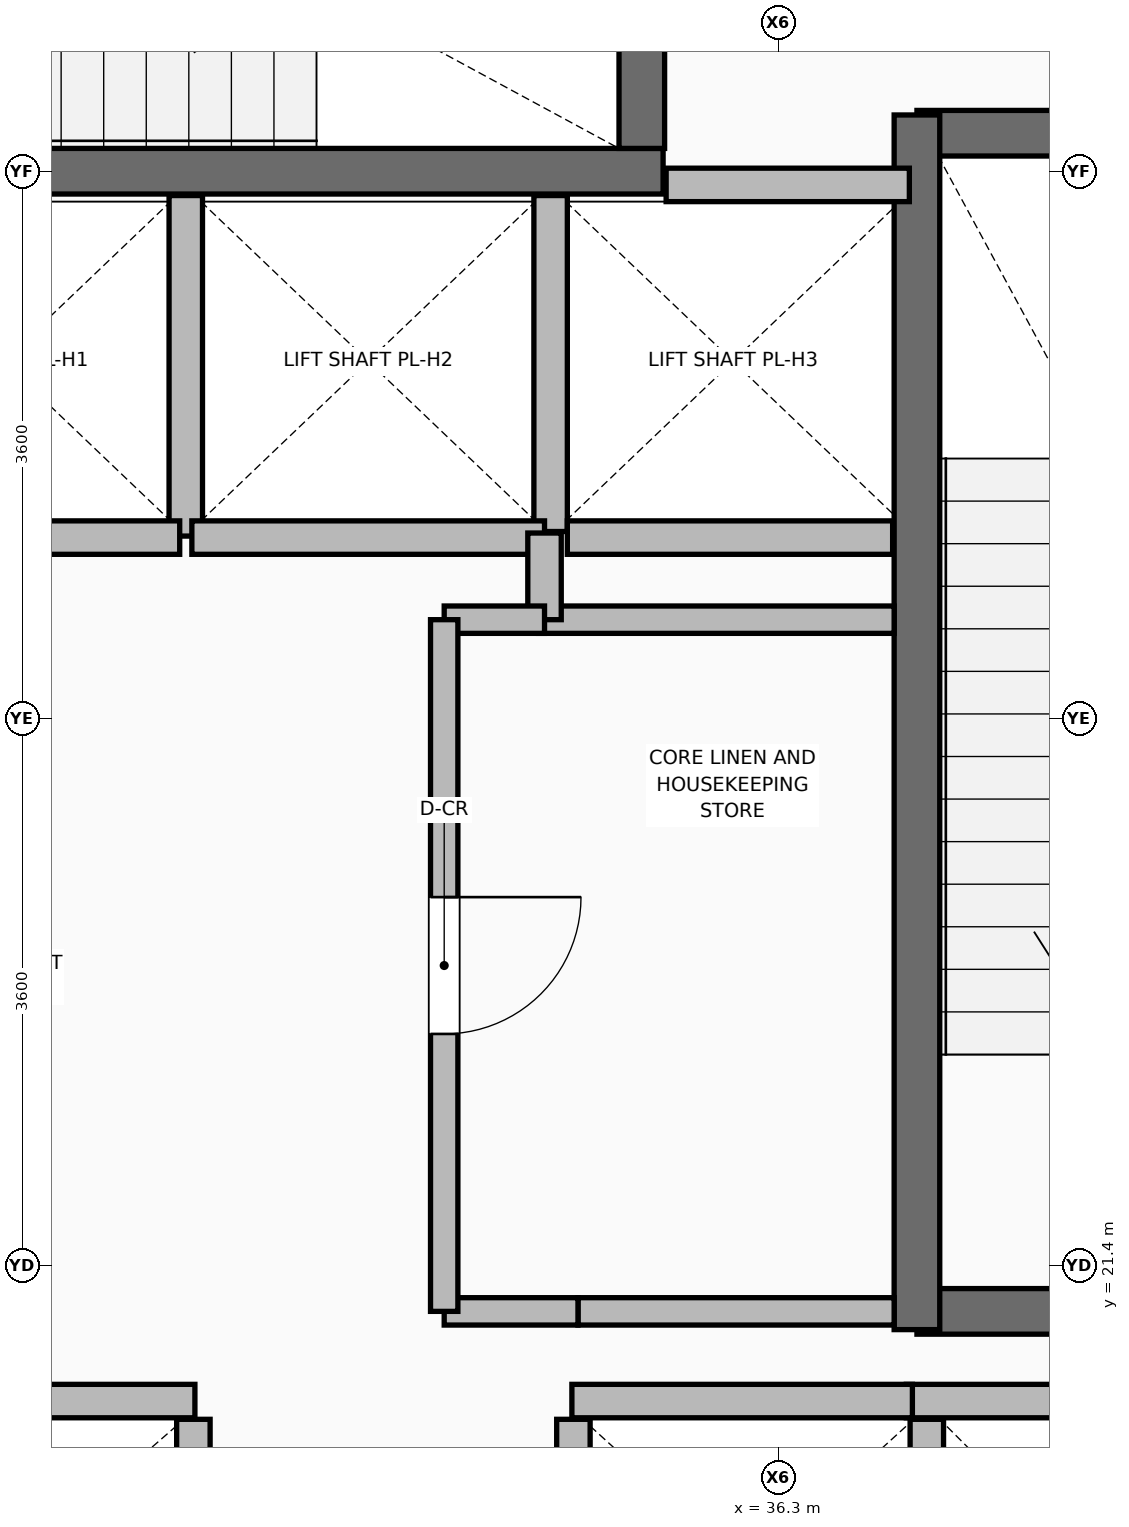
"""IFC4 building model, lengths in metres.
Left out: names, types, materials, properties, quantities, classifications, styles, units other than length and angle.
Written with IfcOpenShell. Run it as: python <this file> out.ifc"""

import sys

from ifc_helpers import new_model, si_unit, direction, frame, frame_2d, origin, place, context, subcontext, project, spatial, rectangle, extrude, element, fill, save


model = new_model("IFC4")
c1 = context("Model", 3, precision=1e-05, world=origin(), true_north=direction((0.0, 1.0)))
c2 = subcontext(c1, "Body", "Model", "MODEL_VIEW")
j1 = project(units=[si_unit("LENGTHUNIT", "METRE"), si_unit("PLANEANGLEUNIT", "RADIAN")], contexts=[c1])
p1 = place(None, origin())
s1 = spatial("IfcSite", under=j1, at=p1, CompositionType="ELEMENT")
p2 = place(p1, origin())
s2 = spatial("IfcBuilding", under=s1, at=p2, CompositionType="ELEMENT")
p3 = place(p2, frame((0.0, 0.0, 90.75)))
s3 = spatial("IfcBuildingStorey", under=s2, at=p3, CompositionType="ELEMENT", Elevation=90.75)
for number, where, z_axis, x_axis in (
    (1, (32.45, 17.92, 0.0), (0.0, 0.0, 1.0), (0.0, 1.0, 0.0)),
    (2, (34.95, 17.92, 0.0), (0.0, 0.0, 1.0), (0.0, 1.0, 0.0)),
):
    element("IfcWall", number, at=place(p3, frame(where, z_axis=z_axis, x_axis=x_axis)), inside=s3, PredefinedType="PARTITIONING", context=c2, shape_type="SweptSolid", body=[
        extrude(rectangle(XDim=2.47, YDim=0.22, at=frame_2d((1.235, 0.0))), origin(), (0.0, 0.0, 1.0), 4.578),
    ])
p4 = place(p3, frame((37.275, 18.08, 0.0), z_axis=(0.0, 0.0, 1.0), x_axis=(0.0, 1.0, 0.0)))
e3 = element("IfcWall", 3, at=p4, inside=s3, PredefinedType="PARTITIONING", context=c2, shape_type="SweptSolid", body=[
    extrude(rectangle(XDim=2.31, YDim=0.22, at=frame_2d((1.155, 0.0))), origin(), (0.0, 0.0, 1.0), 5.195),
])
p5 = place(p3, frame((32.4, 26.2, 0.0), z_axis=(0.0, 0.0, 1.0), x_axis=(0.0, 1.0, 0.0)))
e4 = element("IfcWall", 4, at=p5, inside=s3, PredefinedType="PARTITIONING", context=c2, shape_type="SweptSolid", body=[
    extrude(rectangle(XDim=2.24, YDim=0.22, at=frame_2d((1.12, 0.0))), origin(), (0.0, 0.0, 1.0), 5.195),
])
p6 = place(p3, frame((34.8, 26.23, 0.0), z_axis=(0.0, 0.0, 1.0), x_axis=(0.0, 1.0, 0.0)))
e5 = element("IfcWall", 5, at=p6, inside=s3, PredefinedType="PARTITIONING", context=c2, shape_type="SweptSolid", body=[
    extrude(rectangle(XDim=2.21, YDim=0.22, at=frame_2d((1.105, 0.0))), origin(), (0.0, 0.0, 1.0), 5.195),
])
p7 = place(p3, frame((34.91, 26.19, 0.0), z_axis=(0.0, 0.0, 1.0), x_axis=(1.0, 0.0, 0.0)))
e6 = element("IfcWall", 6, at=p7, inside=s3, PredefinedType="PARTITIONING", context=c2, shape_type="SweptSolid", body=[
    extrude(rectangle(XDim=2.14, YDim=0.22, at=frame_2d((1.07, 0.0))), origin(), (0.0, 0.0, 1.0), 5.195),
])
for number, where, z_axis, x_axis in (
    (7, (37.21, 21.1, 0.0), (0.0, 0.0, 1.0), (1.0, 0.0, 0.0)),
    (8, (37.21, 28.85, 0.0), (0.0, 0.0, 1.0), (1.0, 0.0, 0.0)),
):
    element("IfcWall", number, at=place(p3, frame(where, z_axis=z_axis, x_axis=x_axis)), inside=s3, PredefinedType="SHEAR", context=c2, shape_type="SweptSolid", body=[
        extrude(rectangle(XDim=3.565, YDim=0.3, at=frame_2d((1.782, 0.0))), origin(), (0.0, 0.0, 1.0), 5.22),
    ])
p8 = place(p3, frame((37.21, 20.98, 0.0), z_axis=(0.0, 0.0, 1.0), x_axis=(0.0, 1.0, 0.0)))
e9 = element("IfcWall", 9, at=p8, inside=s3, PredefinedType="SHEAR", context=c2, shape_type="SweptSolid", body=[
    extrude(rectangle(XDim=7.99, YDim=0.3, at=frame_2d((3.995, 0.0))), origin(), (0.0, 0.0, 1.0), 5.22),
])
p9 = place(p3, frame((27.51, 28.6, 0.0), z_axis=(0.0, 0.0, 1.0), x_axis=(1.0, 0.0, 0.0)))
e10 = element("IfcWall", 10, at=p9, inside=s3, PredefinedType="SHEAR", context=c2, shape_type="SweptSolid", body=[
    extrude(rectangle(XDim=8.03, YDim=0.3, at=frame_2d((4.015, 0.0))), origin(), (0.0, 0.0, 1.0), 5.22),
])
p10 = place(p3, frame((35.4, 28.75, 0.0), z_axis=(0.0, 0.0, 1.0), x_axis=(0.0, 1.0, 0.0)))
e11 = element("IfcWall", 11, at=p10, inside=s3, PredefinedType="SHEAR", context=c2, shape_type="SweptSolid", body=[
    extrude(rectangle(XDim=3.375, YDim=0.3, at=frame_2d((1.688, 0.0))), origin(), (0.0, 0.0, 1.0), 5.22),
])
p11 = place(p3, frame((30.04, 20.51, 0.0), z_axis=(0.0, 0.0, 1.0), x_axis=(1.0, 0.0, 0.0)))
e12 = element("IfcWall", 12, at=p11, inside=s3, PredefinedType="PARTITIONING", context=c2, shape_type="SweptSolid", body=[
    extrude(rectangle(XDim=2.42, YDim=0.22, at=frame_2d((1.21, 0.0))), origin(), (0.0, 0.0, 1.0), 5.2),
])
for number, where, z_axis, x_axis in (
    (13, (37.14, 20.51, 0.0), (0.0, 0.0, 1.0), (1.0, 0.0, 0.0)),
    (14, (34.94, 20.51, 0.0), (0.0, 0.0, 1.0), (1.0, 0.0, 0.0)),
):
    element("IfcWall", number, at=place(p3, frame(where, z_axis=z_axis, x_axis=x_axis)), inside=s3, PredefinedType="PARTITIONING", context=c2, shape_type="SweptSolid", body=[
        extrude(rectangle(XDim=2.24, YDim=0.22, at=frame_2d((1.12, 0.0))), origin(), (0.0, 0.0, 1.0), 5.2),
    ])
for number, where, z_axis, x_axis in (
    (15, (30.04, 26.19, 0.0), (0.0, 0.0, 1.0), (1.0, 0.0, 0.0)),
    (16, (32.44, 26.19, 0.0), (0.0, 0.0, 1.0), (1.0, 0.0, 0.0)),
):
    element("IfcWall", number, at=place(p3, frame(where, z_axis=z_axis, x_axis=x_axis)), inside=s3, PredefinedType="PARTITIONING", context=c2, shape_type="SweptSolid", body=[
        extrude(rectangle(XDim=2.32, YDim=0.22, at=frame_2d((1.16, 0.0))), origin(), (0.0, 0.0, 1.0), 5.2),
    ])
p12 = place(p3, frame((35.56, 28.51, 0.0), z_axis=(0.0, 0.0, 1.0), x_axis=(1.0, 0.0, 0.0)))
e17 = element("IfcWall", 17, at=p12, inside=s3, PredefinedType="PARTITIONING", context=c2, shape_type="SweptSolid", body=[
    extrude(rectangle(XDim=1.6, YDim=0.22, at=frame_2d((0.8, 0.0))), origin(), (0.0, 0.0, 1.0), 5.2),
])
p13 = place(p3, frame((34.98, 21.1, 0.0), z_axis=(0.0, 0.0, 1.0), x_axis=(1.0, 0.0, 0.0)))
e18 = element("IfcWall", 18, at=p13, inside=s3, PredefinedType="PARTITIONING", context=c2, shape_type="SweptSolid", body=[
    extrude(rectangle(XDim=2.08, YDim=0.18, at=frame_2d((1.04, 0.0))), origin(), (0.0, 0.0, 1.0), 5.2),
])
p14 = place(p3, frame((34.72, 25.65, 0.0), z_axis=(0.0, 0.0, 1.0), x_axis=(1.0, 0.0, 0.0)))
e19 = element("IfcWall", 19, at=p14, inside=s3, PredefinedType="PARTITIONING", context=c2, shape_type="SweptSolid", body=[
    extrude(rectangle(XDim=2.34, YDim=0.18, at=frame_2d((1.17, 0.0))), origin(), (0.0, 0.0, 1.0), 5.2),
])
p15 = place(p3, frame((34.76, 25.65, 0.0), z_axis=(0.0, 0.0, 1.0), x_axis=(0.0, 1.0, 0.0)))
e20 = element("IfcWall", 20, at=p15, inside=s3, PredefinedType="PARTITIONING", context=c2, shape_type="SweptSolid", body=[
    extrude(rectangle(XDim=0.57, YDim=0.22, at=frame_2d((0.285, 0.0))), origin(), (0.0, 0.0, 1.0), 5.2),
])
p16 = place(p3, frame((34.1, 21.1, 0.0), z_axis=(0.0, 0.0, 1.0), x_axis=(1.0, 0.0, 0.0)))
e21 = element("IfcWall", 21, at=p16, inside=s3, PredefinedType="PARTITIONING", context=c2, shape_type="SweptSolid", body=[
    extrude(rectangle(XDim=0.88, YDim=0.18, at=frame_2d((0.44, 0.0))), origin(), (0.0, 0.0, 1.0), 5.2),
])
p17 = place(p3, frame((34.1, 25.65, 0.0), z_axis=(0.0, 0.0, 1.0), x_axis=(1.0, 0.0, 0.0)))
e22 = element("IfcWall", 22, at=p17, inside=s3, PredefinedType="PARTITIONING", context=c2, shape_type="SweptSolid", body=[
    extrude(rectangle(XDim=0.66, YDim=0.18, at=frame_2d((0.33, 0.0))), origin(), (0.0, 0.0, 1.0), 5.2),
])
p18 = place(p3, frame((34.1, 21.1, 0.0), z_axis=(0.0, 0.0, 1.0), x_axis=(0.0, 1.0, 0.0)))
e23 = element("IfcWall", 23, at=p18, inside=s3, PredefinedType="PARTITIONING", context=c2, shape_type="SweptSolid", body=[
    extrude(rectangle(XDim=4.55, YDim=0.18, at=frame_2d((2.275, 0.0))), origin(), (0.0, 0.0, 1.0), 5.2),
])
p19 = place(p18, frame((1.825, 0.0, 0.0)))
e24 = element("IfcOpeningElement", 24, at=p19, cuts=e23, PredefinedType="OPENING", context=c2, shape_type="SweptSolid", body=[
    extrude(rectangle(XDim=0.9, YDim=2.1, at=frame_2d((0.45, 1.05))), frame((0.0, 0.1, 0.0), z_axis=(0.0, -1.0, 0.0), x_axis=(1.0, 0.0, 0.0)), (0.0, 0.0, 1.0), 0.2),
])
p20 = place(p19, frame((0.9, 0.0, 0.0), z_axis=(0.0, 0.0, 1.0), x_axis=(-1.0, 0.0, 0.0)))
e25 = element("IfcDoor", 25, at=p20, inside=s3, OperationType="SINGLE_SWING_LEFT", PredefinedType="DOOR", context=c2, shape_type="SweptSolid", body=[
    extrude(rectangle(XDim=0.9, YDim=2.1, at=frame_2d((0.45, 1.05))), frame((0.0, 0.025, 0.0), z_axis=(0.0, -1.0, 0.0), x_axis=(1.0, 0.0, 0.0)), (0.0, 0.0, 1.0), 0.05),
])
fill(e24, e25)
save(model, sys.argv[1])
